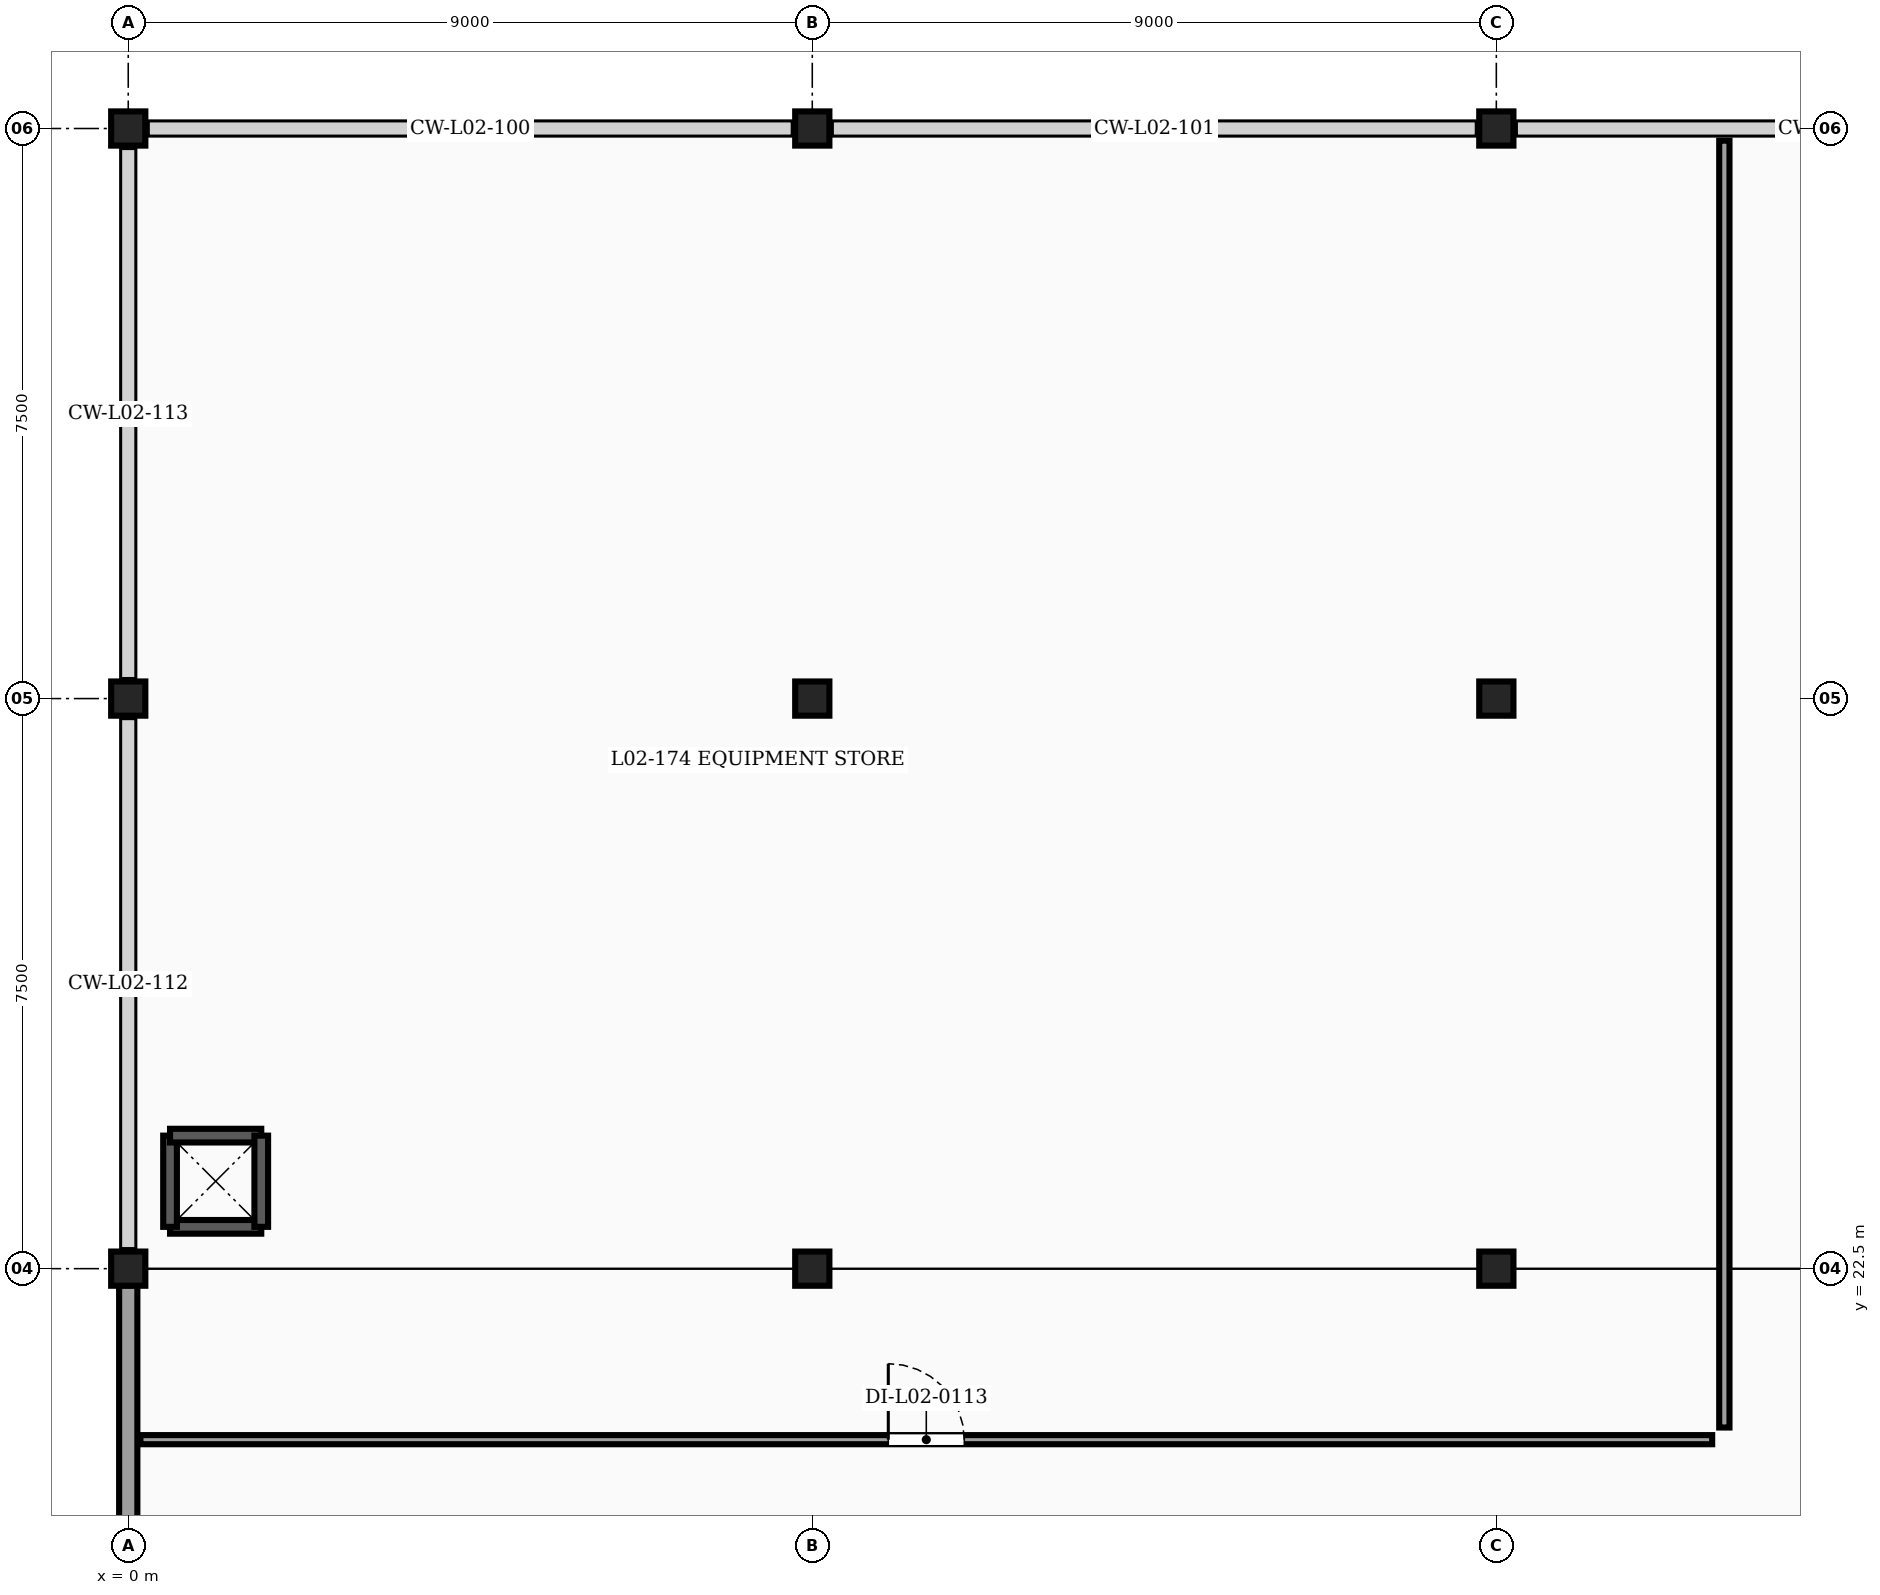
"""IFC4 building model, lengths in metres.
Left out: names, types, materials, properties, quantities, classifications, styles, units other than length and angle.
Written with IfcOpenShell. Run it as: python <this file> out.ifc"""

import sys

from ifc_helpers import new_model, si_unit, direction, frame, frame_2d, origin, origin_2d, place, context, subcontext, project, spatial, rectangle, extrude, element, fill, save


model = new_model("IFC4")
c1 = context("Model", 3, precision=1e-05, world=origin(), true_north=direction((0.0, 1.0)))
c2 = subcontext(c1, "Body", "Model", "MODEL_VIEW")
j1 = project(units=[si_unit("LENGTHUNIT", "METRE"), si_unit("PLANEANGLEUNIT", "RADIAN")], contexts=[c1])
p1 = place(None, origin())
s1 = spatial("IfcSite", under=j1, at=p1, CompositionType="ELEMENT")
p2 = place(p1, origin())
s2 = spatial("IfcBuilding", under=s1, at=p2, CompositionType="ELEMENT")
p3 = place(p2, frame((0.0, 0.0, 8.5)))
s3 = spatial("IfcBuildingStorey", under=s2, at=p3, CompositionType="ELEMENT", Elevation=8.5)
for number, where, z_axis, x_axis in (
    (1, (0.0, 22.5, 0.0), (0.0, 0.0, 1.0), (1.0, 0.0, 0.0)),
    (2, (9.0, 22.5, 0.0), (0.0, 0.0, 1.0), (1.0, 0.0, 0.0)),
    (3, (18.0, 22.5, 0.0), (0.0, 0.0, 1.0), (1.0, 0.0, 0.0)),
    (4, (0.0, 30.0, 0.0), (0.0, 0.0, 1.0), (1.0, 0.0, 0.0)),
    (5, (9.0, 30.0, 0.0), (0.0, 0.0, 1.0), (1.0, 0.0, 0.0)),
    (6, (18.0, 30.0, 0.0), (0.0, 0.0, 1.0), (1.0, 0.0, 0.0)),
    (7, (0.0, 37.5, 0.0), (0.0, 0.0, 1.0), (1.0, 0.0, 0.0)),
    (8, (9.0, 37.5, 0.0), (0.0, 0.0, 1.0), (1.0, 0.0, 0.0)),
    (9, (18.0, 37.5, 0.0), (0.0, 0.0, 1.0), (1.0, 0.0, 0.0)),
):
    element("IfcColumn", number, at=place(p3, frame(where, z_axis=z_axis, x_axis=x_axis)), inside=s3, PredefinedType="COLUMN", context=c2, shape_type="SweptSolid", body=[
        extrude(rectangle(XDim=0.45, YDim=0.45, at=origin_2d()), origin(), (0.0, 0.0, 1.0), 3.8),
    ])
p4 = place(p3, frame((0.0, 15.221, 0.0), z_axis=(0.0, 0.0, 1.0), x_axis=(0.0, 1.0, 0.0)))
e10 = element("IfcWall", 10, at=p4, inside=s3, PredefinedType="SOLIDWALL", context=c2, shape_type="SweptSolid", body=[
    extrude(rectangle(XDim=7.058, YDim=0.24, at=frame_2d((3.529, 0.0))), origin(), (0.0, 0.0, 1.0), 3.23),
])
for number, where, z_axis, x_axis in (
    (11, (1.75, 23.05, 0.0), (0.0, 0.0, 1.0), (-1.0, 0.0, 0.0)),
    (12, (0.55, 23.05, 0.0), (0.0, 0.0, 1.0), (0.0, 1.0, 0.0)),
    (13, (0.55, 24.25, 0.0), (0.0, 0.0, 1.0), (1.0, 0.0, 0.0)),
    (14, (1.75, 24.25, 0.0), (0.0, 0.0, 1.0), (0.0, -1.0, 0.0)),
):
    element("IfcWall", number, at=place(p3, frame(where, z_axis=z_axis, x_axis=x_axis)), inside=s3, PredefinedType="SHEAR", context=c2, shape_type="SweptSolid", body=[
        extrude(rectangle(XDim=1.2, YDim=0.18, at=frame_2d((0.6, 0.0))), origin(), (0.0, 0.0, 1.0), 3.59),
    ])
p5 = place(p3, frame((0.16, 20.25, 0.0), z_axis=(0.0, 0.0, 1.0), x_axis=(1.0, 0.0, 0.0)))
e15 = element("IfcWall", 15, at=p5, inside=s3, PredefinedType="PARTITIONING", context=c2, shape_type="SweptSolid", body=[
    extrude(rectangle(XDim=20.68, YDim=0.12, at=frame_2d((10.34, 0.0))), origin(), (0.0, 0.0, 1.0), 3.59),
])
p6 = place(p5, frame((9.84, 0.0, 0.0)))
e16 = element("IfcOpeningElement", 16, at=p6, cuts=e15, PredefinedType="OPENING", context=c2, shape_type="SweptSolid", body=[
    extrude(rectangle(XDim=1.0, YDim=2.15, at=frame_2d((0.5, 1.075))), frame((0.0, 0.07, 0.0), z_axis=(0.0, -1.0, 0.0), x_axis=(1.0, 0.0, 0.0)), (0.0, 0.0, 1.0), 0.14),
])
p7 = place(p3, frame((21.0, 20.41, 0.0), z_axis=(0.0, 0.0, 1.0), x_axis=(0.0, 1.0, 0.0)))
e17 = element("IfcWall", 17, at=p7, inside=s3, PredefinedType="PARTITIONING", context=c2, shape_type="SweptSolid", body=[
    extrude(rectangle(XDim=16.93, YDim=0.135, at=frame_2d((8.465, 0.0))), origin(), (0.0, 0.0, 1.0), 3.182),
])
p8 = place(p6, origin())
e18 = element("IfcDoor", 18, at=p8, inside=s3, OperationType="SINGLE_SWING_LEFT", PredefinedType="DOOR", context=c2, shape_type="SweptSolid", body=[
    extrude(rectangle(XDim=1.0, YDim=2.15, at=frame_2d((0.5, 1.075))), frame((0.0, 0.025, 0.0), z_axis=(0.0, -1.0, 0.0), x_axis=(1.0, 0.0, 0.0)), (0.0, 0.0, 1.0), 0.05),
])
fill(e16, e18)
save(model, sys.argv[1])
